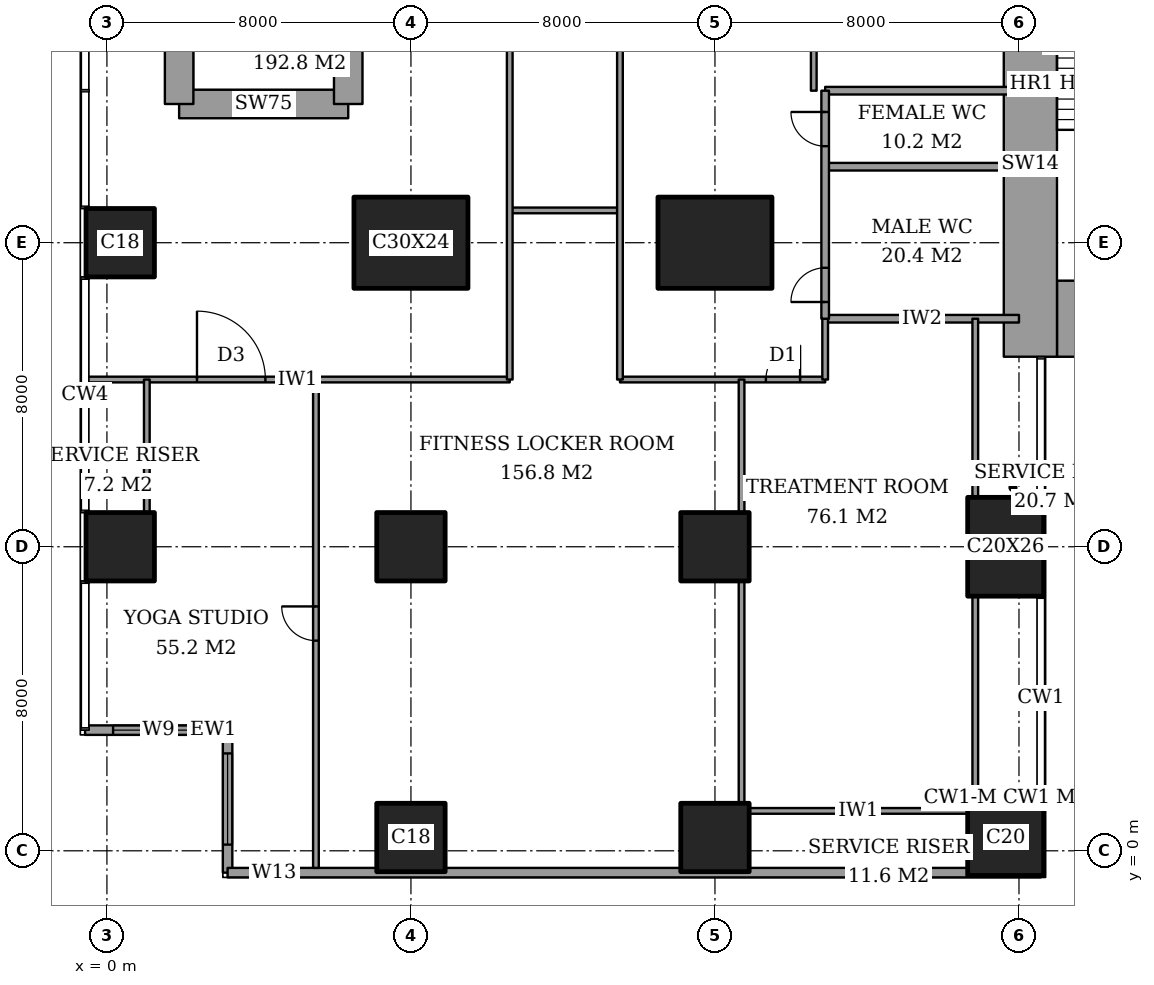
"""IFC4 building model, lengths in metres.
Left out: names, types, materials, properties, quantities, classifications, styles, units other than length and angle.
Written with IfcOpenShell. Run it as: python <this file> out.ifc"""

import sys

from ifc_helpers import new_model, si_unit, direction, frame, frame_2d, origin, origin_2d, place, context, subcontext, project, spatial, rectangle, extrude, element, fill, save


model = new_model("IFC4")
c1 = context("Model", 3, precision=1e-05, world=origin(), true_north=direction((0.0, 1.0)))
c2 = subcontext(c1, "Body", "Model", "MODEL_VIEW")
j1 = project(units=[si_unit("LENGTHUNIT", "METRE"), si_unit("PLANEANGLEUNIT", "RADIAN")], contexts=[c1])
p1 = place(None, origin())
s1 = spatial("IfcSite", under=j1, at=p1, CompositionType="ELEMENT")
p2 = place(p1, origin())
s2 = spatial("IfcBuilding", under=s1, at=p2, CompositionType="ELEMENT")
p3 = place(p2, frame((0.0, 0.0, 200.2)))
s3 = spatial("IfcBuildingStorey", under=s2, at=p3, CompositionType="ELEMENT", Elevation=200.2)
for number, where, z_axis, x_axis in (
    (1, (0.35, 8.0, 0.0), (0.0, 0.0, 1.0), (1.0, 0.0, 0.0)),
    (2, (0.35, 16.0, 0.0), (0.0, 0.0, 1.0), (1.0, 0.0, 0.0)),
    (3, (8.0, 0.35, 0.0), (0.0, 0.0, 1.0), (1.0, 0.0, 0.0)),
    (4, (8.0, 8.0, 0.0), (0.0, 0.0, 1.0), (1.0, 0.0, 0.0)),
):
    element("IfcColumn", number, at=place(p3, frame(where, z_axis=z_axis, x_axis=x_axis)), inside=s3, PredefinedType="COLUMN", context=c2, shape_type="SweptSolid", body=[
        extrude(rectangle(XDim=1.8, YDim=1.8, at=origin_2d()), origin(), (0.0, 0.0, 1.0), 3.6),
    ])
p4 = place(p3, frame((8.0, 16.0, 0.0), z_axis=(0.0, 0.0, 1.0), x_axis=(1.0, 0.0, 0.0)))
e5 = element("IfcColumn", 5, at=p4, inside=s3, PredefinedType="COLUMN", context=c2, shape_type="SweptSolid", body=[
    extrude(rectangle(XDim=3.0, YDim=2.4, at=origin_2d()), origin(), (0.0, 0.0, 1.0), 3.6),
])
for number, where, z_axis, x_axis in (
    (6, (16.0, 0.35, 0.0), (0.0, 0.0, 1.0), (1.0, 0.0, 0.0)),
    (7, (16.0, 8.0, 0.0), (0.0, 0.0, 1.0), (1.0, 0.0, 0.0)),
):
    element("IfcColumn", number, at=place(p3, frame(where, z_axis=z_axis, x_axis=x_axis)), inside=s3, PredefinedType="COLUMN", context=c2, shape_type="SweptSolid", body=[
        extrude(rectangle(XDim=1.8, YDim=1.8, at=origin_2d()), origin(), (0.0, 0.0, 1.0), 3.6),
    ])
p5 = place(p3, frame((16.0, 16.0, 0.0), z_axis=(0.0, 0.0, 1.0), x_axis=(1.0, 0.0, 0.0)))
e8 = element("IfcColumn", 8, at=p5, inside=s3, PredefinedType="COLUMN", context=c2, shape_type="SweptSolid", body=[
    extrude(rectangle(XDim=3.0, YDim=2.4, at=origin_2d()), origin(), (0.0, 0.0, 1.0), 3.6),
])
p6 = place(p3, frame((23.65, 0.35, 0.0), z_axis=(0.0, 0.0, 1.0), x_axis=(1.0, 0.0, 0.0)))
e9 = element("IfcColumn", 9, at=p6, inside=s3, PredefinedType="COLUMN", context=c2, shape_type="SweptSolid", body=[
    extrude(rectangle(XDim=2.0, YDim=2.0, at=origin_2d()), origin(), (0.0, 0.0, 1.0), 3.6),
])
p7 = place(p3, frame((23.65, 8.0, 0.0), z_axis=(0.0, 0.0, 1.0), x_axis=(1.0, 0.0, 0.0)))
e10 = element("IfcColumn", 10, at=p7, inside=s3, PredefinedType="COLUMN", context=c2, shape_type="SweptSolid", body=[
    extrude(rectangle(XDim=2.0, YDim=2.6, at=origin_2d()), origin(), (0.0, 0.0, 1.0), 3.6),
])
p8 = place(p3, frame((25.0, 14.0, 0.0), z_axis=(0.0, 0.0, 1.0), x_axis=(1.0, 0.0, 0.0)))
e11 = element("IfcWall", 11, at=p8, inside=s3, PredefinedType="SHEAR", context=c2, shape_type="SweptSolid", body=[
    extrude(rectangle(XDim=3.15, YDim=2.0, at=frame_2d((1.575, 0.0))), origin(), (0.0, 0.0, 1.0), 3.6),
])
p9 = place(p3, frame((24.3, 13.0, 0.0), z_axis=(0.0, 0.0, 1.0), x_axis=(0.0, 1.0, 0.0)))
e12 = element("IfcWall", 12, at=p9, inside=s3, PredefinedType="SHEAR", context=c2, shape_type="SweptSolid", body=[
    extrude(rectangle(XDim=10.15, YDim=1.4, at=frame_2d((5.075, 0.0))), origin(), (0.0, 0.0, 1.0), 3.6),
])
p10 = place(p3, frame((1.9, 19.65, 0.0), z_axis=(0.0, 0.0, 1.0), x_axis=(1.0, 0.0, 0.0)))
e13 = element("IfcWall", 13, at=p10, inside=s3, PredefinedType="SHEAR", context=c2, shape_type="SweptSolid", body=[
    extrude(rectangle(XDim=4.45, YDim=0.75, at=frame_2d((2.225, 0.0))), origin(), (0.0, 0.0, 1.0), 3.6),
])
for number, where, z_axis, x_axis in (
    (14, (6.35, 19.65, 0.0), (0.0, 0.0, 1.0), (0.0, 1.0, 0.0)),
    (15, (1.9, 28.35, 0.0), (0.0, 0.0, 1.0), (0.0, -1.0, 0.0)),
):
    element("IfcWall", number, at=place(p3, frame(where, z_axis=z_axis, x_axis=x_axis)), inside=s3, PredefinedType="SHEAR", context=c2, shape_type="SweptSolid", body=[
        extrude(rectangle(XDim=8.7, YDim=0.75, at=frame_2d((4.35, 0.0))), origin(), (0.0, 0.0, 1.0), 3.6),
    ])
p11 = place(p3, frame((-0.575, 3.175, 0.0), z_axis=(0.0, 0.0, 1.0), x_axis=(1.0, 0.0, 0.0)))
e16 = element("IfcWall", 16, at=p11, inside=s3, PredefinedType="SOLIDWALL", context=c2, shape_type="SweptSolid", body=[
    extrude(rectangle(XDim=3.75, YDim=0.25, at=frame_2d((1.875, 0.0))), origin(), (0.0, 0.0, 1.0), 3.6),
])
p12 = place(p11, frame((0.738, 0.0, 0.2)))
e17 = element("IfcOpeningElement", 17, at=p12, cuts=e16, PredefinedType="OPENING", context=c2, shape_type="SweptSolid", body=[
    extrude(rectangle(XDim=2.4, YDim=2.4, at=frame_2d((1.2, 1.2))), frame((0.0, 0.135, 0.0), z_axis=(0.0, -1.0, 0.0), x_axis=(1.0, 0.0, 0.0)), (0.0, 0.0, 1.0), 0.27),
])
p13 = place(p3, frame((3.175, 3.175, 0.0), z_axis=(0.0, 0.0, 1.0), x_axis=(0.0, -1.0, 0.0)))
e18 = element("IfcWall", 18, at=p13, inside=s3, PredefinedType="SOLIDWALL", context=c2, shape_type="SweptSolid", body=[
    extrude(rectangle(XDim=3.75, YDim=0.25, at=frame_2d((1.875, 0.0))), origin(), (0.0, 0.0, 1.0), 3.6),
])
p14 = place(p13, frame((0.613, 0.0, 0.2)))
e19 = element("IfcOpeningElement", 19, at=p14, cuts=e18, PredefinedType="OPENING", context=c2, shape_type="SweptSolid", body=[
    extrude(rectangle(XDim=2.4, YDim=2.4, at=frame_2d((1.2, 1.2))), frame((0.0, 0.135, 0.0), z_axis=(0.0, -1.0, 0.0), x_axis=(1.0, 0.0, 0.0)), (0.0, 0.0, 1.0), 0.27),
])
p15 = place(p3, frame((3.175, -0.575, 0.0), z_axis=(0.0, 0.0, 1.0), x_axis=(1.0, 0.0, 0.0)))
e20 = element("IfcWall", 20, at=p15, inside=s3, PredefinedType="SOLIDWALL", context=c2, shape_type="SweptSolid", body=[
    extrude(rectangle(XDim=21.4, YDim=0.25, at=frame_2d((10.7, 0.0))), origin(), (0.0, 0.0, 1.0), 3.6),
])
p16 = place(p15, frame((0.625, 0.0, 0.2)))
e21 = element("IfcOpeningElement", 21, at=p16, cuts=e20, PredefinedType="OPENING", context=c2, shape_type="SweptSolid", body=[
    extrude(rectangle(XDim=1.2, YDim=2.4, at=frame_2d((0.6, 1.2))), frame((0.0, 0.135, 0.0), z_axis=(0.0, -1.0, 0.0), x_axis=(1.0, 0.0, 0.0)), (0.0, 0.0, 1.0), 0.27),
])
p17 = place(p3, frame((16.9, 1.05, 0.0), z_axis=(0.0, 0.0, 1.0), x_axis=(1.0, 0.0, 0.0)))
e22 = element("IfcWall", 22, at=p17, inside=s3, PredefinedType="PARTITIONING", context=c2, shape_type="SweptSolid", body=[
    extrude(rectangle(XDim=5.75, YDim=0.15, at=frame_2d((2.875, 0.0))), origin(), (0.0, 0.0, 1.0), 3.35),
])
p18 = place(p3, frame((-0.561, 12.4, 0.0), z_axis=(0.0, 0.0, 1.0), x_axis=(1.0, 0.0, 0.0)))
e23 = element("IfcWall", 23, at=p18, inside=s3, PredefinedType="PARTITIONING", context=c2, shape_type="SweptSolid", body=[
    extrude(rectangle(XDim=11.161, YDim=0.15, at=frame_2d((5.581, 0.0))), origin(), (0.0, 0.0, 1.0), 3.35),
])
p19 = place(p18, frame((2.931, 0.0, 0.0)))
e24 = element("IfcOpeningElement", 24, at=p19, cuts=e23, PredefinedType="OPENING", context=c2, shape_type="SweptSolid", body=[
    extrude(rectangle(XDim=1.8, YDim=2.1, at=frame_2d((0.9, 1.05))), frame((0.0, 0.085, 0.0), z_axis=(0.0, -1.0, 0.0), x_axis=(1.0, 0.0, 0.0)), (0.0, 0.0, 1.0), 0.17),
])
p20 = place(p3, frame((13.5, 12.4, 0.0), z_axis=(0.0, 0.0, 1.0), x_axis=(1.0, 0.0, 0.0)))
e25 = element("IfcWall", 25, at=p20, inside=s3, PredefinedType="PARTITIONING", context=c2, shape_type="SweptSolid", body=[
    extrude(rectangle(XDim=5.4, YDim=0.15, at=frame_2d((2.7, 0.0))), origin(), (0.0, 0.0, 1.0), 3.35),
])
p21 = place(p20, frame((3.84, 0.0, 0.0)))
e26 = element("IfcOpeningElement", 26, at=p21, cuts=e25, PredefinedType="OPENING", context=c2, shape_type="SweptSolid", body=[
    extrude(rectangle(XDim=0.9, YDim=2.1, at=frame_2d((0.45, 1.05))), frame((0.0, 0.085, 0.0), z_axis=(0.0, -1.0, 0.0), x_axis=(1.0, 0.0, 0.0)), (0.0, 0.0, 1.0), 0.17),
])
p22 = place(p3, frame((18.9, 14.0, 0.0), z_axis=(0.0, 0.0, 1.0), x_axis=(1.0, 0.0, 0.0)))
e27 = element("IfcWall", 27, at=p22, inside=s3, PredefinedType="PARTITIONING", context=c2, shape_type="SweptSolid", body=[
    extrude(rectangle(XDim=5.1, YDim=0.2, at=frame_2d((2.55, 0.0))), origin(), (0.0, 0.0, 1.0), 3.35),
])
p23 = place(p3, frame((10.6, 16.85, 0.0), z_axis=(0.0, 0.0, 1.0), x_axis=(1.0, 0.0, 0.0)))
e28 = element("IfcWall", 28, at=p23, inside=s3, PredefinedType="PARTITIONING", context=c2, shape_type="SweptSolid", body=[
    extrude(rectangle(XDim=2.9, YDim=0.15, at=frame_2d((1.45, 0.0))), origin(), (0.0, 0.0, 1.0), 3.35),
])
for number, where, z_axis, x_axis in (
    (29, (18.9, 18.0, 0.0), (0.0, 0.0, 1.0), (1.0, 0.0, 0.0)),
    (30, (18.9, 20.0, 0.0), (0.0, 0.0, 1.0), (1.0, 0.0, 0.0)),
):
    element("IfcWall", number, at=place(p3, frame(where, z_axis=z_axis, x_axis=x_axis)), inside=s3, PredefinedType="PARTITIONING", context=c2, shape_type="SweptSolid", body=[
        extrude(rectangle(XDim=5.1, YDim=0.2, at=frame_2d((2.55, 0.0))), origin(), (0.0, 0.0, 1.0), 3.35),
    ])
p24 = place(p3, frame((1.05, 8.9, 0.0), z_axis=(0.0, 0.0, 1.0), x_axis=(0.0, 1.0, 0.0)))
e31 = element("IfcWall", 31, at=p24, inside=s3, PredefinedType="PARTITIONING", context=c2, shape_type="SweptSolid", body=[
    extrude(rectangle(XDim=3.5, YDim=0.15, at=frame_2d((1.75, 0.0))), origin(), (0.0, 0.0, 1.0), 3.35),
])
p25 = place(p3, frame((5.5, -0.45, 0.0), z_axis=(0.0, 0.0, 1.0), x_axis=(0.0, 1.0, 0.0)))
e32 = element("IfcWall", 32, at=p25, inside=s3, PredefinedType="PARTITIONING", context=c2, shape_type="SweptSolid", body=[
    extrude(rectangle(XDim=12.85, YDim=0.15, at=frame_2d((6.425, 0.0))), origin(), (0.0, 0.0, 1.0), 3.35),
])
p26 = place(p25, frame((5.98, 0.0, 0.0)))
e33 = element("IfcOpeningElement", 33, at=p26, cuts=e32, PredefinedType="OPENING", context=c2, shape_type="SweptSolid", body=[
    extrude(rectangle(XDim=0.9, YDim=2.1, at=frame_2d((0.45, 1.05))), frame((0.0, 0.085, 0.0), z_axis=(0.0, -1.0, 0.0), x_axis=(1.0, 0.0, 0.0)), (0.0, 0.0, 1.0), 0.17),
])
p27 = place(p3, frame((10.6, 12.4, 0.0), z_axis=(0.0, 0.0, 1.0), x_axis=(0.0, 1.0, 0.0)))
e34 = element("IfcWall", 34, at=p27, inside=s3, PredefinedType="PARTITIONING", context=c2, shape_type="SweptSolid", body=[
    extrude(rectangle(XDim=23.2, YDim=0.15, at=frame_2d((11.6, 0.0))), origin(), (0.0, 0.0, 1.0), 3.35),
])
p28 = place(p27, frame((11.09, 0.0, 0.0)))
e35 = element("IfcOpeningElement", 35, at=p28, cuts=e34, PredefinedType="OPENING", context=c2, shape_type="SweptSolid", body=[
    extrude(rectangle(XDim=1.0, YDim=2.1, at=frame_2d((0.5, 1.05))), frame((0.0, 0.085, 0.0), z_axis=(0.0, -1.0, 0.0), x_axis=(1.0, 0.0, 0.0)), (0.0, 0.0, 1.0), 0.17),
])
p29 = place(p3, frame((13.5, 12.4, 0.0), z_axis=(0.0, 0.0, 1.0), x_axis=(0.0, 1.0, 0.0)))
e36 = element("IfcWall", 36, at=p29, inside=s3, PredefinedType="PARTITIONING", context=c2, shape_type="SweptSolid", body=[
    extrude(rectangle(XDim=23.2, YDim=0.15, at=frame_2d((11.6, 0.0))), origin(), (0.0, 0.0, 1.0), 3.35),
])
p30 = place(p29, frame((11.15, 0.0, 0.0)))
e37 = element("IfcOpeningElement", 37, at=p30, cuts=e36, PredefinedType="OPENING", context=c2, shape_type="SweptSolid", body=[
    extrude(rectangle(XDim=0.9, YDim=2.1, at=frame_2d((0.45, 1.05))), frame((0.0, 0.085, 0.0), z_axis=(0.0, -1.0, 0.0), x_axis=(1.0, 0.0, 0.0)), (0.0, 0.0, 1.0), 0.17),
])
p31 = place(p3, frame((16.7, 1.25, 0.0), z_axis=(0.0, 0.0, 1.0), x_axis=(0.0, 1.0, 0.0)))
e38 = element("IfcWall", 38, at=p31, inside=s3, PredefinedType="PARTITIONING", context=c2, shape_type="SweptSolid", body=[
    extrude(rectangle(XDim=5.85, YDim=0.15, at=frame_2d((2.925, 0.0))), origin(), (0.0, 0.0, 1.0), 3.35),
])
p32 = place(p3, frame((16.7, 8.9, 0.0), z_axis=(0.0, 0.0, 1.0), x_axis=(0.0, 1.0, 0.0)))
e39 = element("IfcWall", 39, at=p32, inside=s3, PredefinedType="PARTITIONING", context=c2, shape_type="SweptSolid", body=[
    extrude(rectangle(XDim=3.5, YDim=0.15, at=frame_2d((1.75, 0.0))), origin(), (0.0, 0.0, 1.0), 3.35),
])
p33 = place(p3, frame((18.6, 20.0, 0.0), z_axis=(0.0, 0.0, 1.0), x_axis=(0.0, 1.0, 0.0)))
e40 = element("IfcWall", 40, at=p33, inside=s3, PredefinedType="PARTITIONING", context=c2, shape_type="SweptSolid", body=[
    extrude(rectangle(XDim=8.0, YDim=0.15, at=frame_2d((4.0, 0.0))), origin(), (0.0, 0.0, 1.0), 3.35),
])
p34 = place(p33, frame((3.5, 0.0, 0.0)))
e41 = element("IfcOpeningElement", 41, at=p34, cuts=e40, PredefinedType="OPENING", context=c2, shape_type="SweptSolid", body=[
    extrude(rectangle(XDim=1.0, YDim=2.1, at=frame_2d((0.5, 1.05))), frame((0.0, 0.085, 0.0), z_axis=(0.0, -1.0, 0.0), x_axis=(1.0, 0.0, 0.0)), (0.0, 0.0, 1.0), 0.17),
])
p35 = place(p3, frame((18.9, 14.0, 0.0), z_axis=(0.0, 0.0, 1.0), x_axis=(0.0, 1.0, 0.0)))
e42 = element("IfcWall", 42, at=p35, inside=s3, PredefinedType="PARTITIONING", context=c2, shape_type="SweptSolid", body=[
    extrude(rectangle(XDim=6.0, YDim=0.2, at=frame_2d((3.0, 0.0))), origin(), (0.0, 0.0, 1.0), 3.35),
])
p36 = place(p35, frame((0.44, 0.0, 0.0)))
e43 = element("IfcOpeningElement", 43, at=p36, cuts=e42, PredefinedType="OPENING", context=c2, shape_type="SweptSolid", body=[
    extrude(rectangle(XDim=0.9, YDim=2.1, at=frame_2d((0.45, 1.05))), frame((0.0, 0.11, 0.0), z_axis=(0.0, -1.0, 0.0), x_axis=(1.0, 0.0, 0.0)), (0.0, 0.0, 1.0), 0.22),
])
p37 = place(p35, frame((4.54, 0.0, 0.0)))
e44 = element("IfcOpeningElement", 44, at=p37, cuts=e42, PredefinedType="OPENING", context=c2, shape_type="SweptSolid", body=[
    extrude(rectangle(XDim=0.9, YDim=2.1, at=frame_2d((0.45, 1.05))), frame((0.0, 0.11, 0.0), z_axis=(0.0, -1.0, 0.0), x_axis=(1.0, 0.0, 0.0)), (0.0, 0.0, 1.0), 0.22),
])
p38 = place(p3, frame((18.9, 12.4, 0.0), z_axis=(0.0, 0.0, 1.0), x_axis=(0.0, 1.0, 0.0)))
e45 = element("IfcWall", 45, at=p38, inside=s3, PredefinedType="PARTITIONING", context=c2, shape_type="SweptSolid", body=[
    extrude(rectangle(XDim=1.6, YDim=0.15, at=frame_2d((0.8, 0.0))), origin(), (0.0, 0.0, 1.0), 3.35),
])
p39 = place(p3, frame((22.85, 1.35, 0.0), z_axis=(0.0, 0.0, 1.0), x_axis=(0.0, 1.0, 0.0)))
e46 = element("IfcWall", 46, at=p39, inside=s3, PredefinedType="PARTITIONING", context=c2, shape_type="SweptSolid", body=[
    extrude(rectangle(XDim=5.35, YDim=0.15, at=frame_2d((2.675, 0.0))), origin(), (0.0, 0.0, 1.0), 3.35),
])
p40 = place(p3, frame((22.85, 9.3, 0.0), z_axis=(0.0, 0.0, 1.0), x_axis=(0.0, 1.0, 0.0)))
e47 = element("IfcWall", 47, at=p40, inside=s3, PredefinedType="PARTITIONING", context=c2, shape_type="SweptSolid", body=[
    extrude(rectangle(XDim=4.7, YDim=0.15, at=frame_2d((2.35, 0.0))), origin(), (0.0, 0.0, 1.0), 3.35),
])
p41 = place(p12, origin())
e48 = element("IfcWindow", 48, at=p41, inside=s3, PartitioningType="SINGLE_PANEL", PredefinedType="WINDOW", context=c2, shape_type="SweptSolid", body=[
    extrude(rectangle(XDim=2.4, YDim=2.4, at=frame_2d((1.2, 1.2))), frame((0.0, 0.03, 0.0), z_axis=(0.0, -1.0, 0.0), x_axis=(1.0, 0.0, 0.0)), (0.0, 0.0, 1.0), 0.06),
])
fill(e17, e48)
p42 = place(p14, origin())
e49 = element("IfcWindow", 49, at=p42, inside=s3, PartitioningType="SINGLE_PANEL", PredefinedType="WINDOW", context=c2, shape_type="SweptSolid", body=[
    extrude(rectangle(XDim=2.4, YDim=2.4, at=frame_2d((1.2, 1.2))), frame((0.0, 0.03, 0.0), z_axis=(0.0, -1.0, 0.0), x_axis=(1.0, 0.0, 0.0)), (0.0, 0.0, 1.0), 0.06),
])
fill(e19, e49)
p43 = place(p16, origin())
e50 = element("IfcWindow", 50, at=p43, inside=s3, PartitioningType="SINGLE_PANEL", PredefinedType="WINDOW", context=c2, shape_type="SweptSolid", body=[
    extrude(rectangle(XDim=1.2, YDim=2.4, at=frame_2d((0.6, 1.2))), frame((0.0, 0.03, 0.0), z_axis=(0.0, -1.0, 0.0), x_axis=(1.0, 0.0, 0.0)), (0.0, 0.0, 1.0), 0.06),
])
fill(e21, e50)
p44 = place(p36, origin())
e51 = element("IfcDoor", 51, at=p44, inside=s3, OperationType="SINGLE_SWING_RIGHT", PredefinedType="DOOR", context=c2, shape_type="SweptSolid", body=[
    extrude(rectangle(XDim=0.9, YDim=2.1, at=frame_2d((0.45, 1.05))), frame((0.0, 0.025, 0.0), z_axis=(0.0, -1.0, 0.0), x_axis=(1.0, 0.0, 0.0)), (0.0, 0.0, 1.0), 0.05),
])
fill(e43, e51)
p45 = place(p37, origin())
e52 = element("IfcDoor", 52, at=p45, inside=s3, OperationType="SINGLE_SWING_LEFT", PredefinedType="DOOR", context=c2, shape_type="SweptSolid", body=[
    extrude(rectangle(XDim=0.9, YDim=2.1, at=frame_2d((0.45, 1.05))), frame((0.0, 0.025, 0.0), z_axis=(0.0, -1.0, 0.0), x_axis=(1.0, 0.0, 0.0)), (0.0, 0.0, 1.0), 0.05),
])
fill(e44, e52)
p46 = place(p19, origin())
e53 = element("IfcDoor", 53, at=p46, inside=s3, OperationType="DOUBLE_DOOR_DOUBLE_SWING", PredefinedType="DOOR", context=c2, shape_type="SweptSolid", body=[
    extrude(rectangle(XDim=1.8, YDim=2.1, at=frame_2d((0.9, 1.05))), frame((0.0, 0.025, 0.0), z_axis=(0.0, -1.0, 0.0), x_axis=(1.0, 0.0, 0.0)), (0.0, 0.0, 1.0), 0.05),
])
fill(e24, e53)
p47 = place(p26, origin())
e54 = element("IfcDoor", 54, at=p47, inside=s3, OperationType="SINGLE_SWING_LEFT", PredefinedType="DOOR", context=c2, shape_type="SweptSolid", body=[
    extrude(rectangle(XDim=0.9, YDim=2.1, at=frame_2d((0.45, 1.05))), frame((0.0, 0.025, 0.0), z_axis=(0.0, -1.0, 0.0), x_axis=(1.0, 0.0, 0.0)), (0.0, 0.0, 1.0), 0.05),
])
fill(e33, e54)
p48 = place(p21, origin())
e55 = element("IfcDoor", 55, at=p48, inside=s3, OperationType="SINGLE_SWING_LEFT", PredefinedType="DOOR", context=c2, shape_type="SweptSolid", body=[
    extrude(rectangle(XDim=0.9, YDim=2.1, at=frame_2d((0.45, 1.05))), frame((0.0, 0.025, 0.0), z_axis=(0.0, -1.0, 0.0), x_axis=(1.0, 0.0, 0.0)), (0.0, 0.0, 1.0), 0.05),
])
fill(e26, e55)
save(model, sys.argv[1])
